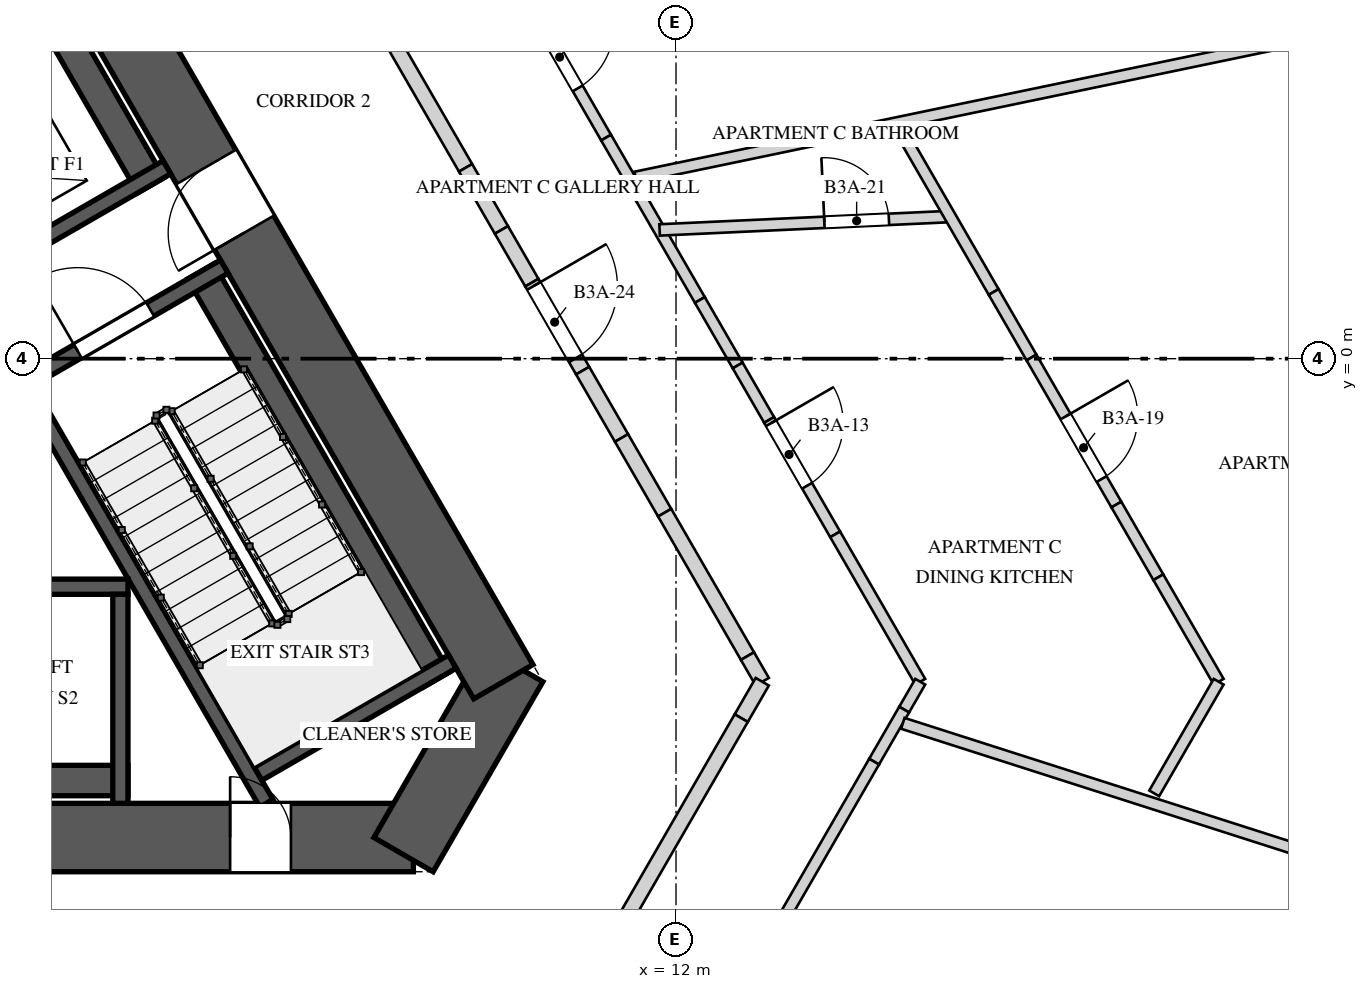
"""IFC4 building model, lengths in metres.
Left out: names, types, materials, properties, quantities, classifications, styles, units other than length and angle.
Written with IfcOpenShell. Run it as: python <this file> out.ifc"""

import sys

from ifc_helpers import new_model, si_unit, direction, frame, frame_2d, origin, place, context, subcontext, project, spatial, polyline, rectangle, outline, extrude, element, fill, save


model = new_model("IFC4")
c1 = context("Model", 3, precision=1e-05, world=origin(), true_north=direction((0.0, 1.0)))
c2 = subcontext(c1, "Body", "Model", "MODEL_VIEW")
j1 = project(units=[si_unit("LENGTHUNIT", "METRE"), si_unit("PLANEANGLEUNIT", "RADIAN")], contexts=[c1])
p1 = place(None, origin())
s1 = spatial("IfcSite", under=j1, at=p1, CompositionType="ELEMENT")
p2 = place(p1, origin())
s2 = spatial("IfcBuilding", under=s1, at=p2, CompositionType="ELEMENT")
p3 = place(p2, frame((0.0, 0.0, 129.6)))
s3 = spatial("IfcBuildingStorey", under=s2, at=p3, CompositionType="ELEMENT", Elevation=129.6)
p4 = place(p3, frame((-8.545, -6.3, 0.0), z_axis=(0.0, 0.0, 1.0), x_axis=(1.0, 0.0, 0.0)))
e1 = element("IfcWall", 1, at=p4, inside=s3, PredefinedType="SHEAR", context=c2, shape_type="SweptSolid", body=[
    extrude(rectangle(XDim=17.09, YDim=0.9, at=frame_2d((8.545, 0.0))), origin(), (0.0, 0.0, 1.0), 4.0),
])
p5 = place(p4, frame((6.75, 0.0, 0.0)))
e2 = element("IfcOpeningElement", 2, at=p5, cuts=e1, PredefinedType="OPENING", context=c2, shape_type="SweptSolid", body=[
    extrude(rectangle(XDim=1.0, YDim=2.4, at=frame_2d((0.5, 1.2))), frame((0.0, 0.46, 0.0), z_axis=(0.0, -1.0, 0.0), x_axis=(1.0, 0.0, 0.0)), (0.0, 0.0, 1.0), 0.92),
])
p6 = place(p4, frame((14.678, 0.0, 0.0)))
e3 = element("IfcOpeningElement", 3, at=p6, cuts=e1, PredefinedType="OPENING", context=c2, shape_type="SweptSolid", body=[
    extrude(rectangle(XDim=0.8, YDim=2.1, at=frame_2d((0.4, 1.05))), frame((0.0, 0.46, 0.0), z_axis=(0.0, -1.0, 0.0), x_axis=(1.0, 0.0, 0.0)), (0.0, 0.0, 1.0), 0.92),
])
p7 = place(p3, frame((8.415, -6.525, 0.0), z_axis=(0.0, 0.0, 1.0), x_axis=(0.500059191753, 0.865991226713, 0.0)))
e4 = element("IfcWall", 4, at=p7, inside=s3, PredefinedType="SHEAR", context=c2, shape_type="SweptSolid", body=[
    extrude(rectangle(XDim=2.887, YDim=0.9, at=frame_2d((1.443, 0.0))), origin(), (0.0, 0.0, 1.0), 4.0),
])
p8 = place(p3, frame((9.729, -4.25, 0.0), z_axis=(0.0, 0.0, 1.0), x_axis=(-0.500004814304, 0.866022624227, 0.0)))
e5 = element("IfcWall", 5, at=p8, inside=s3, PredefinedType="SHEAR", context=c2, shape_type="SweptSolid", body=[
    extrude(rectangle(XDim=17.09, YDim=0.9, at=frame_2d((8.545, 0.0))), origin(), (0.0, 0.0, 1.0), 4.0),
])
p9 = place(p8, frame((6.82, 0.0, 0.0)))
e6 = element("IfcOpeningElement", 6, at=p9, cuts=e5, PredefinedType="OPENING", context=c2, shape_type="SweptSolid", body=[
    extrude(rectangle(XDim=1.0, YDim=2.4, at=frame_2d((0.5, 1.2))), frame((0.0, 0.46, 0.0), z_axis=(0.0, -1.0, 0.0), x_axis=(1.0, 0.0, 0.0)), (0.0, 0.0, 1.0), 0.92),
])
p10 = place(p3, frame((8.846, -4.222, 0.0), z_axis=(0.0, 0.0, 1.0), x_axis=(-0.500009909098, 0.866019682689, 0.0)))
e7 = element("IfcWall", 7, at=p10, inside=s3, PredefinedType="SOLIDWALL", context=c2, shape_type="SweptSolid", body=[
    extrude(rectangle(XDim=6.2, YDim=0.4, at=frame_2d((3.1, 0.0))), origin(), (0.0, 0.0, 1.0), 3.65),
])
p11 = place(p3, frame((6.611, -5.85, 0.0), z_axis=(0.0, 0.0, 1.0), x_axis=(-0.499965531574, 0.866045303225, 0.0)))
e8 = element("IfcWall", 8, at=p11, inside=s3, PredefinedType="SOLIDWALL", context=c2, shape_type="SweptSolid", body=[
    extrude(rectangle(XDim=6.492, YDim=0.2, at=frame_2d((3.246, 0.0))), origin(), (0.0, 0.0, 1.0), 3.65),
])
p12 = place(p3, frame((6.501, -5.461, 0.0), z_axis=(0.0, 0.0, 1.0), x_axis=(0.866003658127, 0.500037662692, 0.0)))
e9 = element("IfcWall", 9, at=p12, inside=s3, PredefinedType="SOLIDWALL", context=c2, shape_type="SweptSolid", body=[
    extrude(rectangle(XDim=2.95, YDim=0.2, at=frame_2d((1.475, 0.0))), origin(), (0.0, 0.0, 1.0), 3.65),
])
p13 = place(p3, frame((3.501, -0.265, 0.0), z_axis=(0.0, 0.0, 1.0), x_axis=(0.866039495442, 0.49997559174, 0.0)))
e10 = element("IfcWall", 10, at=p13, inside=s3, PredefinedType="SOLIDWALL", context=c2, shape_type="SweptSolid", body=[
    extrude(rectangle(XDim=2.95, YDim=0.2, at=frame_2d((1.475, 0.0))), origin(), (0.0, 0.0, 1.0), 3.65),
])
p14 = place(p13, frame((0.725, 0.0, 0.0)))
e11 = element("IfcOpeningElement", 11, at=p14, cuts=e10, PredefinedType="OPENING", context=c2, shape_type="SweptSolid", body=[
    extrude(rectangle(XDim=1.1, YDim=2.4, at=frame_2d((0.55, 1.2))), frame((0.0, 0.11, 0.0), z_axis=(0.0, -1.0, 0.0), x_axis=(1.0, 0.0, 0.0)), (0.0, 0.0, 1.0), 0.22),
])
p15 = place(p3, frame((-0.71, -3.0, 0.0), z_axis=(0.0, 0.0, 1.0), x_axis=(1.0, 0.0, 0.0)))
e12 = element("IfcWall", 12, at=p15, inside=s3, PredefinedType="SOLIDWALL", context=c2, shape_type="SweptSolid", body=[
    extrude(rectangle(XDim=5.5, YDim=0.2, at=frame_2d((2.75, 0.0))), origin(), (0.0, 0.0, 1.0), 3.65),
])
p16 = place(p3, frame((-0.71, -5.55, 0.0), z_axis=(0.0, 0.0, 1.0), x_axis=(1.0, 0.0, 0.0)))
e13 = element("IfcWall", 13, at=p16, inside=s3, PredefinedType="SOLIDWALL", context=c2, shape_type="SweptSolid", body=[
    extrude(rectangle(XDim=5.5, YDim=0.4, at=frame_2d((2.75, 0.0))), origin(), (0.0, 0.0, 1.0), 3.65),
])
p17 = place(p3, frame((4.69, -3.1, 0.0), z_axis=(0.0, 0.0, 1.0), x_axis=(0.0, -1.0, 0.0)))
e14 = element("IfcWall", 14, at=p17, inside=s3, PredefinedType="SOLIDWALL", context=c2, shape_type="SweptSolid", body=[
    extrude(rectangle(XDim=2.75, YDim=0.2, at=frame_2d((1.375, 0.0))), origin(), (0.0, 0.0, 1.0), 3.65),
])
p18 = place(p3, frame((5.092, 2.281, 0.0), z_axis=(0.0, 0.0, 1.0), x_axis=(-0.500018594424, 0.866014668023, 0.0)))
e15 = element("IfcWall", 15, at=p18, inside=s3, PredefinedType="SOLIDWALL", context=c2, shape_type="SweptSolid", body=[
    extrude(rectangle(XDim=4.9, YDim=0.4, at=frame_2d((2.45, 0.0))), origin(), (0.0, 0.0, 1.0), 3.65),
])
for number, where, z_axis, x_axis in (
    (16, (2.227, 0.743, 0.0), (0.0, 0.0, 1.0), (0.866, 0.5, 0.0)),
    (17, (1.052, 2.778, 0.0), (0.0, 0.0, 1.0), (0.866, 0.5, 0.0)),
):
    element("IfcWall", number, at=place(p3, frame(where, z_axis=z_axis, x_axis=x_axis)), inside=s3, PredefinedType="SOLIDWALL", context=c2, shape_type="SweptSolid", body=[
        extrude(rectangle(XDim=3.55, YDim=0.2, at=frame_2d((1.775, 0.0))), origin(), (0.0, 0.0, 1.0), 3.65),
    ])
p19 = place(p3, frame((9.681, 5.331, 0.0), z_axis=(0.0, 0.0, 1.0), x_axis=(0.500034735108, -0.866005348532, 0.0)))
e18 = element("IfcWall", 18, at=p19, inside=s3, PredefinedType="PARTITIONING", context=c2, shape_type="SweptSolid", body=[
    extrude(rectangle(XDim=2.797, YDim=0.15, at=frame_2d((1.398, 0.0))), origin(), (0.0, 0.0, 1.0), 3.65),
])
p20 = place(p19, frame((1.1, 0.0, 0.0)))
e19 = element("IfcOpeningElement", 19, at=p20, cuts=e18, PredefinedType="OPENING", context=c2, shape_type="SweptSolid", body=[
    extrude(rectangle(XDim=0.95, YDim=2.4, at=frame_2d((0.475, 1.2))), frame((0.0, 0.085, 0.0), z_axis=(0.0, -1.0, 0.0), x_axis=(1.0, 0.0, 0.0)), (0.0, 0.0, 1.0), 0.17),
])
p21 = place(p3, frame((11.08, 2.909, 0.0), z_axis=(0.0, 0.0, 1.0), x_axis=(0.500060322201, -0.865990573944, 0.0)))
e20 = element("IfcWall", 20, at=p21, inside=s3, PredefinedType="PARTITIONING", context=c2, shape_type="SweptSolid", body=[
    extrude(rectangle(XDim=0.917, YDim=0.15, at=frame_2d((0.459, 0.0))), origin(), (0.0, 0.0, 1.0), 2.55),
])
p22 = place(p3, frame((11.539, 2.114, 0.0), z_axis=(0.0, 0.0, 1.0), x_axis=(0.499986163319, -0.866033392248, 0.0)))
e21 = element("IfcWall", 21, at=p22, inside=s3, PredefinedType="PARTITIONING", context=c2, shape_type="SweptSolid", body=[
    extrude(rectangle(XDim=1.549, YDim=0.15, at=frame_2d((0.775, 0.0))), origin(), (0.0, 0.0, 1.0), 3.65),
])
p23 = place(p3, frame((12.313, 0.772, 0.0), z_axis=(0.0, 0.0, 1.0), x_axis=(0.499991453095, -0.866030338286, 0.0)))
e22 = element("IfcWall", 22, at=p23, inside=s3, PredefinedType="PARTITIONING", context=c2, shape_type="SweptSolid", body=[
    extrude(rectangle(XDim=0.995, YDim=0.15, at=frame_2d((0.498, 0.0))), origin(), (0.0, 0.0, 1.0), 2.55),
])
p24 = place(p3, frame((12.811, -0.089, 0.0), z_axis=(0.0, 0.0, 1.0), x_axis=(0.500012022864, -0.866018462269, 0.0)))
e23 = element("IfcWall", 23, at=p24, inside=s3, PredefinedType="PARTITIONING", context=c2, shape_type="SweptSolid", body=[
    extrude(rectangle(XDim=0.827, YDim=0.15, at=frame_2d((0.414, 0.0))), origin(), (0.0, 0.0, 1.0), 3.65),
])
p25 = place(p3, frame((13.225, -0.806, 0.0), z_axis=(0.0, 0.0, 1.0), x_axis=(0.500006134913, -0.866021861762, 0.0)))
e24 = element("IfcWall", 24, at=p25, inside=s3, PredefinedType="PARTITIONING", context=c2, shape_type="SweptSolid", body=[
    extrude(outline(polyline([(0.0, 0.0), (1.738, 0.0), (1.738, 2.55), (0.635, 2.55), (0.635, 3.65), (0.0, 3.65), (0.0, 0.0)])), frame((0.0, 0.075, 0.0), z_axis=(0.0, -1.0, 0.0), x_axis=(1.0, 0.0, 0.0)), (0.0, 0.0, 1.0), 0.15),
])
p26 = place(p25, frame((0.05, 0.0, 0.0)))
e25 = element("IfcOpeningElement", 25, at=p26, cuts=e24, PredefinedType="OPENING", context=c2, shape_type="SweptSolid", body=[
    extrude(rectangle(XDim=0.95, YDim=2.4, at=frame_2d((0.475, 1.2))), frame((0.0, 0.085, 0.0), z_axis=(0.0, -1.0, 0.0), x_axis=(1.0, 0.0, 0.0)), (0.0, 0.0, 1.0), 0.17),
])
p27 = place(p3, frame((14.094, -2.311, 0.0), z_axis=(0.0, 0.0, 1.0), x_axis=(0.499974169222, -0.866040316677, 0.0)))
e26 = element("IfcWall", 26, at=p27, inside=s3, PredefinedType="PARTITIONING", context=c2, shape_type="SweptSolid", body=[
    extrude(rectangle(XDim=2.239, YDim=0.15, at=frame_2d((1.119, 0.0))), origin(), (0.0, 0.0, 1.0), 3.65),
])
p28 = place(p3, frame((11.468, 2.386, 0.0), z_axis=(0.0, 0.0, 1.0), x_axis=(0.979030724859, 0.203712640211, 0.0)))
e27 = element("IfcWall", 27, at=p28, inside=s3, PredefinedType="PARTITIONING", context=c2, shape_type="SweptSolid", body=[
    extrude(rectangle(XDim=11.864, YDim=0.15, at=frame_2d((5.932, 0.0))), origin(), (0.0, 0.0, 1.0), 2.55),
])
p29 = place(p3, frame((11.784, 1.694, 0.0), z_axis=(0.0, 0.0, 1.0), x_axis=(0.998933757579, 0.046166524337, 0.0)))
e28 = element("IfcWall", 28, at=p29, inside=s3, PredefinedType="PARTITIONING", context=c2, shape_type="SweptSolid", body=[
    extrude(rectangle(XDim=3.823, YDim=0.15, at=frame_2d((1.912, 0.0))), origin(), (0.0, 0.0, 1.0), 3.65),
])
p30 = place(p29, frame((2.17, 0.0, 0.0)))
e29 = element("IfcOpeningElement", 29, at=p30, cuts=e28, PredefinedType="OPENING", context=c2, shape_type="SweptSolid", body=[
    extrude(rectangle(XDim=0.85, YDim=2.4, at=frame_2d((0.425, 1.2))), frame((0.0, 0.085, 0.0), z_axis=(0.0, -1.0, 0.0), x_axis=(1.0, 0.0, 0.0)), (0.0, 0.0, 1.0), 0.17),
])
p31 = place(p3, frame((14.936, 3.031, 0.0), z_axis=(0.0, 0.0, 1.0), x_axis=(0.499298623879, -0.866429964967, 0.0)))
e30 = element("IfcWall", 30, at=p31, inside=s3, PredefinedType="PARTITIONING", context=c2, shape_type="SweptSolid", body=[
    extrude(rectangle(XDim=0.166, YDim=0.15, at=frame_2d((0.083, 0.0))), origin(), (0.0, 0.0, 1.0), 2.55),
])
p32 = place(p3, frame((15.019, 2.887, 0.0), z_axis=(0.0, 0.0, 1.0), x_axis=(0.50006548692, -0.865987591592, 0.0)))
e31 = element("IfcWall", 31, at=p32, inside=s3, PredefinedType="PARTITIONING", context=c2, shape_type="SweptSolid", body=[
    extrude(rectangle(XDim=2.321, YDim=0.15, at=frame_2d((1.16, 0.0))), origin(), (0.0, 0.0, 1.0), 3.65),
])
p33 = place(p3, frame((16.179, 0.877, 0.0), z_axis=(0.0, 0.0, 1.0), x_axis=(0.499991453095, -0.866030338286, 0.0)))
e32 = element("IfcWall", 32, at=p33, inside=s3, PredefinedType="PARTITIONING", context=c2, shape_type="SweptSolid", body=[
    extrude(rectangle(XDim=0.995, YDim=0.15, at=frame_2d((0.498, 0.0))), origin(), (0.0, 0.0, 1.0), 2.55),
])
p34 = place(p3, frame((16.677, 0.016, 0.0), z_axis=(0.0, 0.0, 1.0), x_axis=(0.499958946799, -0.866049104564, 0.0)))
e33 = element("IfcWall", 33, at=p34, inside=s3, PredefinedType="PARTITIONING", context=c2, shape_type="SweptSolid", body=[
    extrude(rectangle(XDim=2.234, YDim=0.15, at=frame_2d((1.117, 0.0))), origin(), (0.0, 0.0, 1.0), 3.65),
])
p35 = place(p34, frame((0.896, 0.0, 0.0)))
e34 = element("IfcOpeningElement", 34, at=p35, cuts=e33, PredefinedType="OPENING", context=c2, shape_type="SweptSolid", body=[
    extrude(rectangle(XDim=0.95, YDim=2.4, at=frame_2d((0.475, 1.2))), frame((0.0, 0.085, 0.0), z_axis=(0.0, -1.0, 0.0), x_axis=(1.0, 0.0, 0.0)), (0.0, 0.0, 1.0), 0.17),
])
p36 = place(p3, frame((17.793, -1.919, 0.0), z_axis=(0.0, 0.0, 1.0), x_axis=(0.500111757231, -0.865960871102, 0.0)))
e35 = element("IfcWall", 35, at=p36, inside=s3, PredefinedType="PARTITIONING", context=c2, shape_type="SweptSolid", body=[
    extrude(rectangle(XDim=1.104, YDim=0.15, at=frame_2d((0.552, 0.0))), origin(), (0.0, 0.0, 1.0), 2.55),
])
p37 = place(p3, frame((18.345, -2.875, 0.0), z_axis=(0.0, 0.0, 1.0), x_axis=(0.499926564348, -0.866067797727, 0.0)))
e36 = element("IfcWall", 36, at=p37, inside=s3, PredefinedType="PARTITIONING", context=c2, shape_type="SweptSolid", body=[
    extrude(rectangle(XDim=1.588, YDim=0.15, at=frame_2d((0.794, 0.0))), origin(), (0.0, 0.0, 1.0), 3.65),
])
p38 = place(p3, frame((15.213, -4.25, 0.0), z_axis=(0.0, 0.0, 1.0), x_axis=(-0.499922110319, -0.866070368743, 0.0)))
e37 = element("IfcWall", 37, at=p38, inside=s3, PredefinedType="PARTITIONING", context=c2, shape_type="SweptSolid", body=[
    extrude(rectangle(XDim=0.423, YDim=0.15, at=frame_2d((0.212, 0.0))), origin(), (0.0, 0.0, 1.0), 3.65),
])
p39 = place(p3, frame((15.001, -4.617, 0.0), z_axis=(0.0, 0.0, 1.0), x_axis=(-0.49989173393, -0.866087902207, 0.0)))
e38 = element("IfcWall", 38, at=p39, inside=s3, PredefinedType="PARTITIONING", context=c2, shape_type="SweptSolid", body=[
    extrude(rectangle(XDim=0.791, YDim=0.15, at=frame_2d((0.396, 0.0))), origin(), (0.0, 0.0, 1.0), 2.75),
])
p40 = place(p3, frame((14.606, -5.302, 0.0), z_axis=(0.0, 0.0, 1.0), x_axis=(-0.50004374799, -0.866000144397, 0.0)))
e39 = element("IfcWall", 39, at=p40, inside=s3, PredefinedType="PARTITIONING", context=c2, shape_type="SweptSolid", body=[
    extrude(rectangle(XDim=4.209, YDim=0.15, at=frame_2d((2.105, 0.0))), origin(), (0.0, 0.0, 1.0), 3.65),
])
p41 = place(p40, frame((2.518, 0.0, 0.0)))
e40 = element("IfcOpeningElement", 40, at=p41, cuts=e39, PredefinedType="OPENING", context=c2, shape_type="SweptSolid", body=[
    extrude(rectangle(XDim=0.95, YDim=2.4, at=frame_2d((0.475, 1.2))), frame((0.0, 0.085, 0.0), z_axis=(0.0, -1.0, 0.0), x_axis=(1.0, 0.0, 0.0)), (0.0, 0.0, 1.0), 0.17),
])
p42 = place(p3, frame((19.139, -4.25, 0.0), z_axis=(0.0, 0.0, 1.0), x_axis=(-0.49996337474, -0.866046548355, 0.0)))
e41 = element("IfcWall", 41, at=p42, inside=s3, PredefinedType="PARTITIONING", context=c2, shape_type="SweptSolid", body=[
    extrude(rectangle(XDim=1.696, YDim=0.15, at=frame_2d((0.848, 0.0))), origin(), (0.0, 0.0, 1.0), 3.65),
])
p43 = place(p3, frame((22.454, -7.189, 0.0), z_axis=(0.0, 0.0, 1.0), x_axis=(-0.952376070942, 0.304925924606, 0.0)))
e42 = element("IfcWall", 42, at=p43, inside=s3, PredefinedType="PARTITIONING", context=c2, shape_type="SweptSolid", body=[
    extrude(rectangle(XDim=7.844, YDim=0.15, at=frame_2d((3.922, 0.0))), origin(), (0.0, 0.0, 1.0), 2.75),
])
p44 = place(p3, frame((8.142, 4.397, 0.0), z_axis=(0.0, 0.0, 1.0), x_axis=(0.499948868167, -0.866054922749, 0.0)))
e43 = element("IfcWall", 43, at=p44, inside=s3, PredefinedType="SOLIDWALL", context=c2, shape_type="SweptSolid", body=[
    extrude(rectangle(XDim=2.178, YDim=0.2, at=frame_2d((1.089, 0.0))), origin(), (0.0, 0.0, 1.0), 3.65),
])
p45 = place(p3, frame((9.231, 2.511, 0.0), z_axis=(0.0, 0.0, 1.0), x_axis=(0.500118100521, -0.865957207679, 0.0)))
e44 = element("IfcWall", 44, at=p45, inside=s3, PredefinedType="SOLIDWALL", context=c2, shape_type="SweptSolid", body=[
    extrude(rectangle(XDim=0.944, YDim=0.2, at=frame_2d((0.472, 0.0))), origin(), (0.0, 0.0, 1.0), 2.55),
])
p46 = place(p3, frame((9.703, 1.694, 0.0), z_axis=(0.0, 0.0, 1.0), x_axis=(0.499942357345, -0.866058681229, 0.0)))
e45 = element("IfcWall", 45, at=p46, inside=s3, PredefinedType="SOLIDWALL", context=c2, shape_type="SweptSolid", body=[
    extrude(rectangle(XDim=0.801, YDim=0.2, at=frame_2d((0.4, 0.0))), origin(), (0.0, 0.0, 1.0), 3.65),
])
p47 = place(p3, frame((10.104, 1.0, 0.0), z_axis=(0.0, 0.0, 1.0), x_axis=(0.499891098986, -0.866088268685, 0.0)))
e46 = element("IfcWall", 46, at=p47, inside=s3, PredefinedType="SOLIDWALL", context=c2, shape_type="SweptSolid", body=[
    extrude(outline(polyline([(0.0, 0.0), (1.337, 0.0), (1.337, 2.55), (0.313, 2.55), (0.313, 3.65), (0.0, 3.65), (0.0, 0.0)])), frame((0.0, 0.1, 0.0), z_axis=(0.0, -1.0, 0.0), x_axis=(1.0, 0.0, 0.0)), (0.0, 0.0, 1.0), 0.2),
])
p48 = place(p47, frame((0.05, 0.0, 0.0)))
e47 = element("IfcOpeningElement", 47, at=p48, cuts=e46, PredefinedType="OPENING", context=c2, shape_type="SweptSolid", body=[
    extrude(rectangle(XDim=1.1, YDim=2.4, at=frame_2d((0.55, 1.2))), frame((0.0, 0.11, 0.0), z_axis=(0.0, -1.0, 0.0), x_axis=(1.0, 0.0, 0.0)), (0.0, 0.0, 1.0), 0.22),
])
p49 = place(p3, frame((10.772, -0.157, 0.0), z_axis=(0.0, 0.0, 1.0), x_axis=(0.500170198676, -0.865927117231, 0.0)))
e48 = element("IfcWall", 48, at=p49, inside=s3, PredefinedType="SOLIDWALL", context=c2, shape_type="SweptSolid", body=[
    extrude(rectangle(XDim=1.023, YDim=0.2, at=frame_2d((0.511, 0.0))), origin(), (0.0, 0.0, 1.0), 3.65),
])
p50 = place(p3, frame((11.283, -1.043, 0.0), z_axis=(0.0, 0.0, 1.0), x_axis=(0.500001688065, -0.866024429177, 0.0)))
e49 = element("IfcWall", 49, at=p50, inside=s3, PredefinedType="SOLIDWALL", context=c2, shape_type="SweptSolid", body=[
    extrude(rectangle(XDim=1.135, YDim=0.2, at=frame_2d((0.568, 0.0))), origin(), (0.0, 0.0, 1.0), 2.55),
])
p51 = place(p3, frame((11.851, -2.026, 0.0), z_axis=(0.0, 0.0, 1.0), x_axis=(0.50001992892, -0.866013897511, 0.0)))
e50 = element("IfcWall", 50, at=p51, inside=s3, PredefinedType="SOLIDWALL", context=c2, shape_type="SweptSolid", body=[
    extrude(rectangle(XDim=2.179, YDim=0.2, at=frame_2d((1.089, 0.0))), origin(), (0.0, 0.0, 1.0), 3.65),
])
p52 = place(p3, frame((12.94, -3.913, 0.0), z_axis=(0.0, 0.0, 1.0), x_axis=(0.499849133735, -0.866112488944, 0.0)))
e51 = element("IfcWall", 51, at=p52, inside=s3, PredefinedType="SOLIDWALL", context=c2, shape_type="SweptSolid", body=[
    extrude(rectangle(XDim=0.389, YDim=0.2, at=frame_2d((0.195, 0.0))), origin(), (0.0, 0.0, 1.0), 2.75),
])
p53 = place(p3, frame((13.135, -4.25, 0.0), z_axis=(0.0, 0.0, 1.0), x_axis=(-0.499887958344, -0.866090081402, 0.0)))
e52 = element("IfcWall", 52, at=p53, inside=s3, PredefinedType="SOLIDWALL", context=c2, shape_type="SweptSolid", body=[
    extrude(rectangle(XDim=0.553, YDim=0.2, at=frame_2d((0.277, 0.0))), origin(), (0.0, 0.0, 1.0), 2.75),
])
p54 = place(p3, frame((12.858, -4.729, 0.0), z_axis=(0.0, 0.0, 1.0), x_axis=(-0.500031425827, -0.866007259314, 0.0)))
e53 = element("IfcWall", 53, at=p54, inside=s3, PredefinedType="SOLIDWALL", context=c2, shape_type="SweptSolid", body=[
    extrude(rectangle(XDim=3.602, YDim=0.2, at=frame_2d((1.801, 0.0))), origin(), (0.0, 0.0, 1.0), 3.65),
])
p55 = place(p14, origin())
e54 = element("IfcDoor", 54, at=p55, inside=s3, OperationType="SINGLE_SWING_RIGHT", PredefinedType="DOOR", context=c2, shape_type="SweptSolid", body=[
    extrude(rectangle(XDim=1.1, YDim=2.4, at=frame_2d((0.55, 1.2))), frame((0.0, 0.025, 0.0), z_axis=(0.0, -1.0, 0.0), x_axis=(1.0, 0.0, 0.0)), (0.0, 0.0, 1.0), 0.05),
])
fill(e11, e54)
p56 = place(p9, origin())
e55 = element("IfcDoor", 55, at=p56, inside=s3, OperationType="SINGLE_SWING_RIGHT", PredefinedType="DOOR", context=c2, shape_type="SweptSolid", body=[
    extrude(rectangle(XDim=1.0, YDim=2.4, at=frame_2d((0.5, 1.2))), frame((0.0, 0.025, 0.0), z_axis=(0.0, -1.0, 0.0), x_axis=(1.0, 0.0, 0.0)), (0.0, 0.0, 1.0), 0.05),
])
fill(e6, e55)
p57 = place(p6, origin())
e56 = element("IfcDoor", 56, at=p57, inside=s3, OperationType="SINGLE_SWING_RIGHT", PredefinedType="DOOR", context=c2, shape_type="SweptSolid", body=[
    extrude(rectangle(XDim=0.8, YDim=2.1, at=frame_2d((0.4, 1.05))), frame((0.0, 0.025, 0.0), z_axis=(0.0, -1.0, 0.0), x_axis=(1.0, 0.0, 0.0)), (0.0, 0.0, 1.0), 0.05),
])
fill(e3, e56)
p58 = place(p26, origin())
e57 = element("IfcDoor", 57, at=p58, inside=s3, OperationType="SINGLE_SWING_LEFT", PredefinedType="DOOR", context=c2, shape_type="SweptSolid", body=[
    extrude(rectangle(XDim=0.95, YDim=2.4, at=frame_2d((0.475, 1.2))), frame((0.0, 0.025, 0.0), z_axis=(0.0, -1.0, 0.0), x_axis=(1.0, 0.0, 0.0)), (0.0, 0.0, 1.0), 0.05),
])
fill(e25, e57)
p59 = place(p20, origin())
e58 = element("IfcDoor", 58, at=p59, inside=s3, OperationType="SINGLE_SWING_LEFT", PredefinedType="DOOR", context=c2, shape_type="SweptSolid", body=[
    extrude(rectangle(XDim=0.95, YDim=2.4, at=frame_2d((0.475, 1.2))), frame((0.0, 0.025, 0.0), z_axis=(0.0, -1.0, 0.0), x_axis=(1.0, 0.0, 0.0)), (0.0, 0.0, 1.0), 0.05),
])
fill(e19, e58)
p60 = place(p35, origin())
e59 = element("IfcDoor", 59, at=p60, inside=s3, OperationType="SINGLE_SWING_LEFT", PredefinedType="DOOR", context=c2, shape_type="SweptSolid", body=[
    extrude(rectangle(XDim=0.95, YDim=2.4, at=frame_2d((0.475, 1.2))), frame((0.0, 0.025, 0.0), z_axis=(0.0, -1.0, 0.0), x_axis=(1.0, 0.0, 0.0)), (0.0, 0.0, 1.0), 0.05),
])
fill(e34, e59)
p61 = place(p30, origin())
e60 = element("IfcDoor", 60, at=p61, inside=s3, OperationType="SINGLE_SWING_LEFT", PredefinedType="DOOR", context=c2, shape_type="SweptSolid", body=[
    extrude(rectangle(XDim=0.85, YDim=2.4, at=frame_2d((0.425, 1.2))), frame((0.0, 0.025, 0.0), z_axis=(0.0, -1.0, 0.0), x_axis=(1.0, 0.0, 0.0)), (0.0, 0.0, 1.0), 0.05),
])
fill(e29, e60)
p62 = place(p48, origin())
e61 = element("IfcDoor", 61, at=p62, inside=s3, OperationType="SINGLE_SWING_RIGHT", PredefinedType="DOOR", context=c2, shape_type="SweptSolid", body=[
    extrude(rectangle(XDim=1.1, YDim=2.4, at=frame_2d((0.55, 1.2))), frame((0.0, 0.025, 0.0), z_axis=(0.0, -1.0, 0.0), x_axis=(1.0, 0.0, 0.0)), (0.0, 0.0, 1.0), 0.05),
])
fill(e47, e61)
save(model, sys.argv[1])
